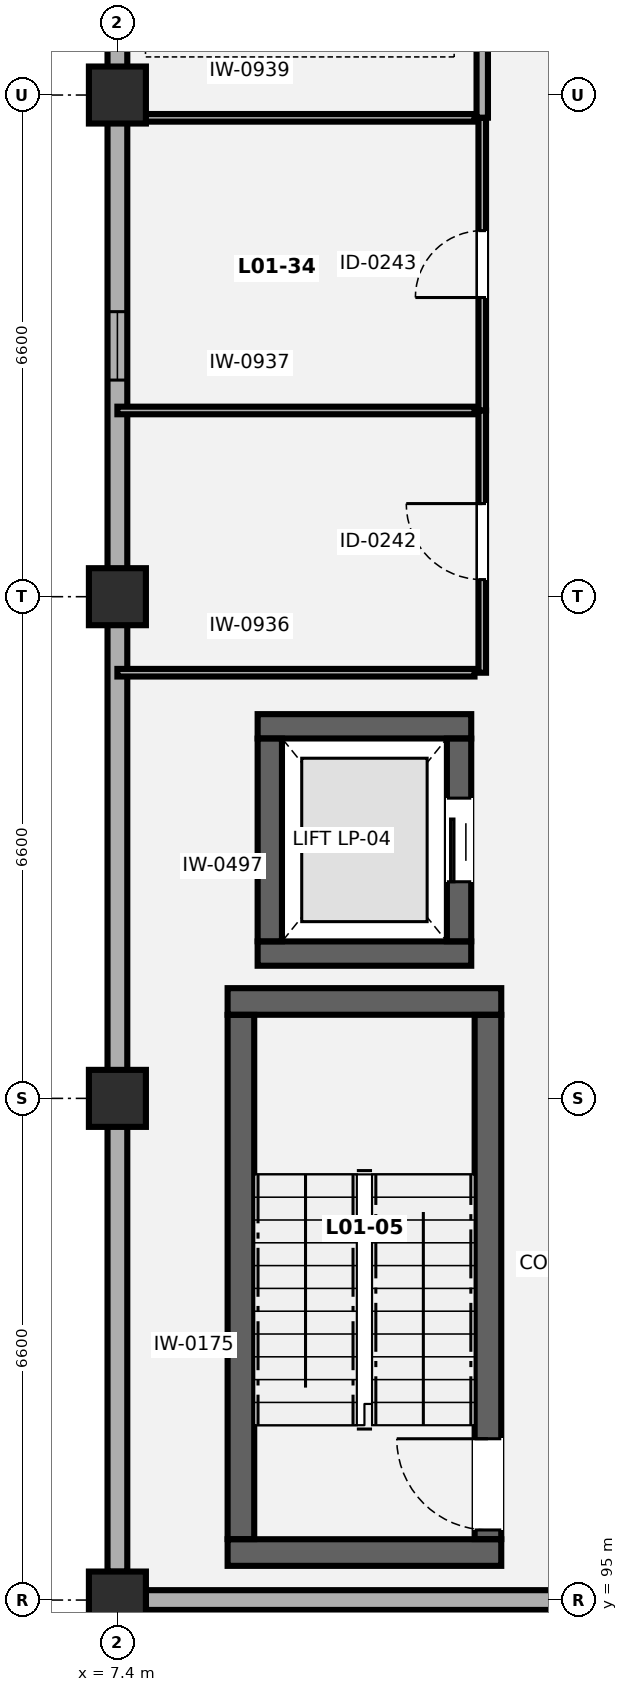
"""IFC4 building model, lengths in metres.
Left out: names, types, materials, properties, quantities, classifications, styles, units other than length and angle.
Written with IfcOpenShell. Run it as: python <this file> out.ifc"""

import sys

from ifc_helpers import new_model, si_unit, direction, frame, frame_2d, origin, origin_2d, place, context, subcontext, project, spatial, rectangle, extrude, element, fill, save


model = new_model("IFC4")
c1 = context("Model", 3, precision=1e-05, world=origin(), true_north=direction((0.0, 1.0)))
c2 = subcontext(c1, "Body", "Model", "MODEL_VIEW")
j1 = project(units=[si_unit("LENGTHUNIT", "METRE"), si_unit("PLANEANGLEUNIT", "RADIAN")], contexts=[c1])
p1 = place(None, origin())
s1 = spatial("IfcSite", under=j1, at=p1, CompositionType="ELEMENT")
p2 = place(p1, origin())
s2 = spatial("IfcBuilding", under=s1, at=p2, CompositionType="ELEMENT")
p3 = place(p2, frame((0.0, 0.0, 4.9)))
s3 = spatial("IfcBuildingStorey", under=s2, at=p3, CompositionType="ELEMENT", Elevation=4.9)
for number, where, z_axis, x_axis in (
    (1, (7.4, 95.0, 0.0), (0.0, 0.0, 1.0), (1.0, 0.0, 0.0)),
    (2, (7.4, 101.6, 0.0), (0.0, 0.0, 1.0), (1.0, 0.0, 0.0)),
    (3, (7.4, 108.2, 0.0), (0.0, 0.0, 1.0), (1.0, 0.0, 0.0)),
    (4, (7.4, 114.8, 0.0), (0.0, 0.0, 1.0), (1.0, 0.0, 0.0)),
):
    element("IfcColumn", number, at=place(p3, frame(where, z_axis=z_axis, x_axis=x_axis)), inside=s3, PredefinedType="COLUMN", context=c2, shape_type="SweptSolid", body=[
        extrude(rectangle(XDim=0.75, YDim=0.75, at=origin_2d()), origin(), (0.0, 0.0, 1.0), 4.2),
    ])
p4 = place(p3, frame((7.4, 95.373, 0.0), z_axis=(0.0, 0.0, 1.0), x_axis=(0.0, 1.0, 0.0)))
e5 = element("IfcWall", 5, at=p4, inside=s3, PredefinedType="SOLIDWALL", context=c2, shape_type="SweptSolid", body=[
    extrude(rectangle(XDim=66.454, YDim=0.26, at=frame_2d((33.227, 0.0))), origin(), (0.0, 0.0, 1.0), 2.885),
])
p5 = place(p4, frame((15.677, 0.0, 0.85)))
e6 = element("IfcOpeningElement", 6, at=p5, cuts=e5, PredefinedType="OPENING", context=c2, shape_type="SweptSolid", body=[
    extrude(rectangle(XDim=0.9, YDim=1.35, at=frame_2d((0.45, 0.675))), frame((0.0, 0.14, 0.0), z_axis=(0.0, -1.0, 0.0), x_axis=(1.0, 0.0, 0.0)), (0.0, 0.0, 1.0), 0.28),
])
p6 = place(p4, frame((28.877, 0.0, 0.85)))
e7 = element("IfcOpeningElement", 7, at=p6, cuts=e5, PredefinedType="OPENING", context=c2, shape_type="SweptSolid", body=[
    extrude(rectangle(XDim=0.9, YDim=1.35, at=frame_2d((0.45, 0.675))), frame((0.0, 0.14, 0.0), z_axis=(0.0, -1.0, 0.0), x_axis=(1.0, 0.0, 0.0)), (0.0, 0.0, 1.0), 0.28),
])
p7 = place(p4, frame((42.077, 0.0, 0.85)))
e8 = element("IfcOpeningElement", 8, at=p7, cuts=e5, PredefinedType="OPENING", context=c2, shape_type="SweptSolid", body=[
    extrude(rectangle(XDim=0.9, YDim=1.35, at=frame_2d((0.45, 0.675))), frame((0.0, 0.14, 0.0), z_axis=(0.0, -1.0, 0.0), x_axis=(1.0, 0.0, 0.0)), (0.0, 0.0, 1.0), 0.28),
])
p8 = place(p4, frame((55.277, 0.0, 0.85)))
e9 = element("IfcOpeningElement", 9, at=p8, cuts=e5, PredefinedType="OPENING", context=c2, shape_type="SweptSolid", body=[
    extrude(rectangle(XDim=0.9, YDim=1.35, at=frame_2d((0.45, 0.675))), frame((0.0, 0.14, 0.0), z_axis=(0.0, -1.0, 0.0), x_axis=(1.0, 0.0, 0.0)), (0.0, 0.0, 1.0), 0.28),
])
p9 = place(p3, frame((26.827, 95.0, 0.0), z_axis=(0.0, 0.0, 1.0), x_axis=(-1.0, 0.0, 0.0)))
e10 = element("IfcWall", 10, at=p9, inside=s3, PredefinedType="SOLIDWALL", context=c2, shape_type="SweptSolid", body=[
    extrude(rectangle(XDim=19.054, YDim=0.26, at=frame_2d((9.527, 0.0))), origin(), (0.0, 0.0, 1.0), 2.48),
])
p10 = place(p9, frame((1.427, 0.0, 0.85)))
e11 = element("IfcOpeningElement", 11, at=p10, cuts=e10, PredefinedType="OPENING", context=c2, shape_type="SweptSolid", body=[
    extrude(rectangle(XDim=1.7, YDim=1.4, at=frame_2d((0.85, 0.7))), frame((0.0, 0.14, 0.0), z_axis=(0.0, -1.0, 0.0), x_axis=(1.0, 0.0, 0.0)), (0.0, 0.0, 1.0), 0.28),
])
for number, where, z_axis, x_axis in (
    (12, (8.85, 95.625, 0.0), (0.0, 0.0, 1.0), (1.0, 0.0, 0.0)),
    (13, (8.85, 102.875, 0.0), (0.0, 0.0, 1.0), (1.0, 0.0, 0.0)),
):
    element("IfcWall", number, at=place(p3, frame(where, z_axis=z_axis, x_axis=x_axis)), inside=s3, PredefinedType="SHEAR", context=c2, shape_type="SweptSolid", body=[
        extrude(rectangle(XDim=3.6, YDim=0.35, at=frame_2d((1.8, 0.0))), origin(), (0.0, 0.0, 1.0), 3.85),
    ])
p11 = place(p3, frame((9.025, 95.802, 0.0), z_axis=(0.0, 0.0, 1.0), x_axis=(0.0, 1.0, 0.0)))
e14 = element("IfcWall", 14, at=p11, inside=s3, PredefinedType="SHEAR", context=c2, shape_type="SweptSolid", body=[
    extrude(rectangle(XDim=6.896, YDim=0.35, at=frame_2d((3.448, 0.0))), origin(), (0.0, 0.0, 1.0), 3.85),
])
p12 = place(p3, frame((12.275, 95.802, 0.0), z_axis=(0.0, 0.0, 1.0), x_axis=(0.0, 1.0, 0.0)))
e15 = element("IfcWall", 15, at=p12, inside=s3, PredefinedType="SHEAR", context=c2, shape_type="SweptSolid", body=[
    extrude(rectangle(XDim=6.896, YDim=0.35, at=frame_2d((3.448, 0.0))), origin(), (0.0, 0.0, 1.0), 3.85),
])
p13 = place(p12, frame((0.12, 0.0, 0.0)))
e16 = element("IfcOpeningElement", 16, at=p13, cuts=e15, PredefinedType="OPENING", context=c2, shape_type="SweptSolid", body=[
    extrude(rectangle(XDim=1.2, YDim=2.15, at=frame_2d((0.6, 1.075))), frame((0.0, 0.185, 0.0), z_axis=(0.0, -1.0, 0.0), x_axis=(1.0, 0.0, 0.0)), (0.0, 0.0, 1.0), 0.37),
])
for number, where, z_axis, x_axis in (
    (17, (9.245, 103.505, 0.0), (0.0, 0.0, 1.0), (1.0, 0.0, 0.0)),
    (18, (9.245, 106.495, 0.0), (0.0, 0.0, 1.0), (1.0, 0.0, 0.0)),
):
    element("IfcWall", number, at=place(p3, frame(where, z_axis=z_axis, x_axis=x_axis)), inside=s3, PredefinedType="SHEAR", context=c2, shape_type="SweptSolid", body=[
        extrude(rectangle(XDim=2.81, YDim=0.32, at=frame_2d((1.405, 0.0))), origin(), (0.0, 0.0, 1.0), 3.85),
    ])
p14 = place(p3, frame((9.405, 103.667, 0.0), z_axis=(0.0, 0.0, 1.0), x_axis=(0.0, 1.0, 0.0)))
e19 = element("IfcWall", 19, at=p14, inside=s3, PredefinedType="SHEAR", context=c2, shape_type="SweptSolid", body=[
    extrude(rectangle(XDim=2.666, YDim=0.32, at=frame_2d((1.333, 0.0))), origin(), (0.0, 0.0, 1.0), 3.85),
])
p15 = place(p3, frame((11.895, 103.667, 0.0), z_axis=(0.0, 0.0, 1.0), x_axis=(0.0, 1.0, 0.0)))
e20 = element("IfcWall", 20, at=p15, inside=s3, PredefinedType="SHEAR", context=c2, shape_type="SweptSolid", body=[
    extrude(rectangle(XDim=2.666, YDim=0.32, at=frame_2d((1.333, 0.0))), origin(), (0.0, 0.0, 1.0), 3.85),
])
p16 = place(p15, frame((0.783, 0.0, 0.0)))
e21 = element("IfcOpeningElement", 21, at=p16, cuts=e20, PredefinedType="OPENING", context=c2, shape_type="SweptSolid", body=[
    extrude(rectangle(XDim=1.1, YDim=2.15, at=frame_2d((0.55, 1.075))), frame((0.0, 0.17, 0.0), z_axis=(0.0, -1.0, 0.0), x_axis=(1.0, 0.0, 0.0)), (0.0, 0.0, 1.0), 0.34),
])
for number, where, z_axis, x_axis in (
    (22, (7.4, 107.2, 0.0), (0.0, 0.0, 1.0), (1.0, 0.0, 0.0)),
    (23, (7.4, 110.65, 0.0), (0.0, 0.0, 1.0), (1.0, 0.0, 0.0)),
):
    element("IfcWall", number, at=place(p3, frame(where, z_axis=z_axis, x_axis=x_axis)), inside=s3, PredefinedType="PARTITIONING", context=c2, shape_type="SweptSolid", body=[
        extrude(rectangle(XDim=4.698, YDim=0.1, at=frame_2d((2.349, 0.0))), origin(), (0.0, 0.0, 1.0), 3.85),
    ])
p17 = place(p3, frame((12.2, 107.2, 0.0), z_axis=(0.0, 0.0, 1.0), x_axis=(0.0, 1.0, 0.0)))
e24 = element("IfcWall", 24, at=p17, inside=s3, PredefinedType="PARTITIONING", context=c2, shape_type="SweptSolid", body=[
    extrude(rectangle(XDim=3.45, YDim=0.1, at=frame_2d((1.725, 0.0))), origin(), (0.0, 0.0, 1.0), 3.85),
])
p18 = place(p17, frame((1.225, 0.0, 0.0)))
e25 = element("IfcOpeningElement", 25, at=p18, cuts=e24, PredefinedType="OPENING", context=c2, shape_type="SweptSolid", body=[
    extrude(rectangle(XDim=1.0, YDim=2.1, at=frame_2d((0.5, 1.05))), frame((0.0, 0.06, 0.0), z_axis=(0.0, -1.0, 0.0), x_axis=(1.0, 0.0, 0.0)), (0.0, 0.0, 1.0), 0.12),
])
p19 = place(p3, frame((7.4, 114.5, 0.0), z_axis=(0.0, 0.0, 1.0), x_axis=(1.0, 0.0, 0.0)))
e26 = element("IfcWall", 26, at=p19, inside=s3, PredefinedType="PARTITIONING", context=c2, shape_type="SweptSolid", body=[
    extrude(rectangle(XDim=4.698, YDim=0.1, at=frame_2d((2.349, 0.0))), origin(), (0.0, 0.0, 1.0), 2.435),
])
p20 = place(p3, frame((12.2, 110.652, 0.0), z_axis=(0.0, 0.0, 1.0), x_axis=(0.0, 1.0, 0.0)))
e27 = element("IfcWall", 27, at=p20, inside=s3, PredefinedType="PARTITIONING", context=c2, shape_type="SweptSolid", body=[
    extrude(rectangle(XDim=3.848, YDim=0.1, at=frame_2d((1.924, 0.0))), origin(), (0.0, 0.0, 1.0), 3.85),
])
p21 = place(p20, frame((1.484, 0.0, 0.0)))
e28 = element("IfcOpeningElement", 28, at=p21, cuts=e27, PredefinedType="OPENING", context=c2, shape_type="SweptSolid", body=[
    extrude(rectangle(XDim=0.88, YDim=2.08, at=frame_2d((0.44, 1.04))), frame((0.0, 0.06, 0.0), z_axis=(0.0, -1.0, 0.0), x_axis=(1.0, 0.0, 0.0)), (0.0, 0.0, 1.0), 0.12),
])
p22 = place(p3, frame((12.2, 114.502, 0.0), z_axis=(0.0, 0.0, 1.0), x_axis=(0.0, 1.0, 0.0)))
e29 = element("IfcWall", 29, at=p22, inside=s3, PredefinedType="PARTITIONING", context=c2, shape_type="SweptSolid", body=[
    extrude(rectangle(XDim=13.298, YDim=0.15, at=frame_2d((6.649, 0.0))), origin(), (0.0, 0.0, 1.0), 3.85),
])
p23 = place(p22, frame((5.649, 0.0, 0.0)))
e30 = element("IfcOpeningElement", 30, at=p23, cuts=e29, PredefinedType="OPENING", context=c2, shape_type="SweptSolid", body=[
    extrude(rectangle(XDim=1.3, YDim=2.2, at=frame_2d((0.65, 1.1))), frame((0.0, 0.085, 0.0), z_axis=(0.0, -1.0, 0.0), x_axis=(1.0, 0.0, 0.0)), (0.0, 0.0, 1.0), 0.17),
])
p24 = place(p5, origin())
e31 = element("IfcWindow", 31, at=p24, inside=s3, PartitioningType="SINGLE_PANEL", PredefinedType="WINDOW", context=c2, shape_type="SweptSolid", body=[
    extrude(rectangle(XDim=0.9, YDim=1.35, at=frame_2d((0.45, 0.675))), frame((0.0, 0.03, 0.0), z_axis=(0.0, -1.0, 0.0), x_axis=(1.0, 0.0, 0.0)), (0.0, 0.0, 1.0), 0.06),
])
fill(e6, e31)
p25 = place(p13, origin())
e32 = element("IfcDoor", 32, at=p25, inside=s3, OperationType="SINGLE_SWING_RIGHT", PredefinedType="DOOR", context=c2, shape_type="SweptSolid", body=[
    extrude(rectangle(XDim=1.2, YDim=2.15, at=frame_2d((0.6, 1.075))), frame((0.0, 0.025, 0.0), z_axis=(0.0, -1.0, 0.0), x_axis=(1.0, 0.0, 0.0)), (0.0, 0.0, 1.0), 0.05),
])
fill(e16, e32)
p26 = place(p16, origin())
e33 = element("IfcDoor", 33, at=p26, inside=s3, OperationType="SLIDING_TO_LEFT", PredefinedType="DOOR", context=c2, shape_type="SweptSolid", body=[
    extrude(rectangle(XDim=1.1, YDim=2.15, at=frame_2d((0.55, 1.075))), frame((0.0, 0.025, 0.0), z_axis=(0.0, -1.0, 0.0), x_axis=(1.0, 0.0, 0.0)), (0.0, 0.0, 1.0), 0.05),
])
fill(e21, e33)
p27 = place(p18, origin())
e34 = element("IfcDoor", 34, at=p27, inside=s3, OperationType="SINGLE_SWING_RIGHT", PredefinedType="DOOR", context=c2, shape_type="SweptSolid", body=[
    extrude(rectangle(XDim=1.0, YDim=2.1, at=frame_2d((0.5, 1.05))), frame((0.0, 0.025, 0.0), z_axis=(0.0, -1.0, 0.0), x_axis=(1.0, 0.0, 0.0)), (0.0, 0.0, 1.0), 0.05),
])
fill(e25, e34)
p28 = place(p21, origin())
e35 = element("IfcDoor", 35, at=p28, inside=s3, OperationType="SINGLE_SWING_LEFT", PredefinedType="DOOR", context=c2, shape_type="SweptSolid", body=[
    extrude(rectangle(XDim=0.88, YDim=2.08, at=frame_2d((0.44, 1.04))), frame((0.0, 0.025, 0.0), z_axis=(0.0, -1.0, 0.0), x_axis=(1.0, 0.0, 0.0)), (0.0, 0.0, 1.0), 0.05),
])
fill(e28, e35)
save(model, sys.argv[1])
